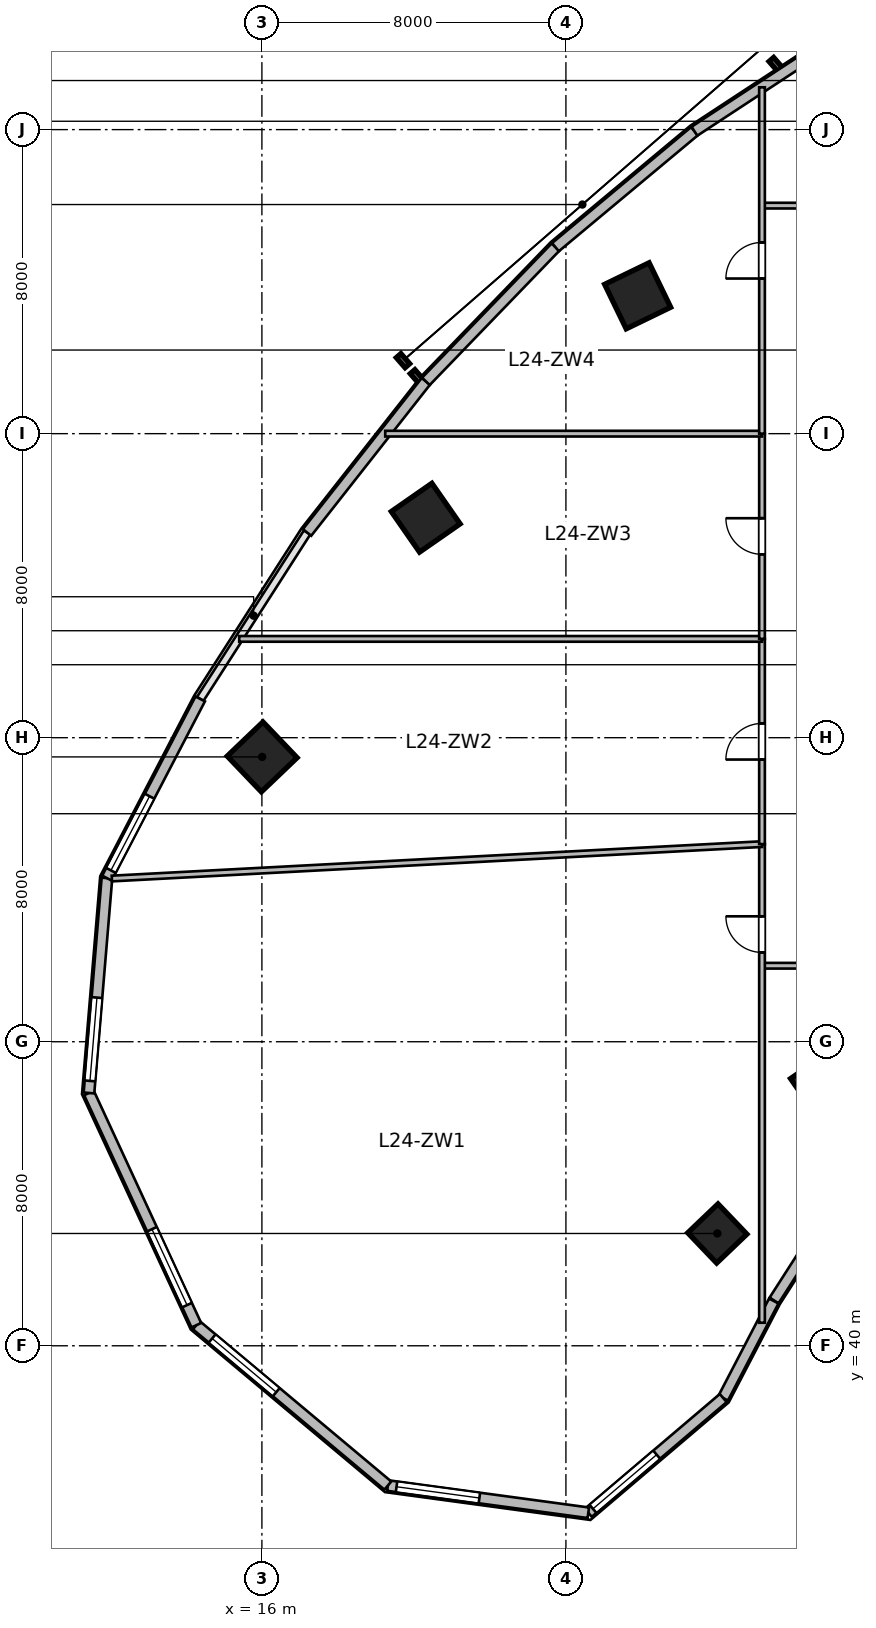
"""IFC4 building model, lengths in metres.
Left out: names, types, materials, properties, quantities, classifications, styles, units other than length and angle.
Written with IfcOpenShell. Run it as: python <this file> out.ifc"""

import sys

from ifc_helpers import new_model, si_unit, direction, frame, frame_2d, origin, origin_2d, place, context, subcontext, project, spatial, rectangle, extrude, source, transform, mapped, element, fill, save


model = new_model("IFC4")
c1 = context("Model", 3, precision=1e-05, world=origin(), true_north=direction((0.0, 1.0)))
c2 = subcontext(c1, "Body", "Model", "MODEL_VIEW")
j1 = project(units=[si_unit("LENGTHUNIT", "METRE"), si_unit("PLANEANGLEUNIT", "RADIAN")], contexts=[c1])
p1 = place(None, origin())
s1 = spatial("IfcSite", under=j1, at=p1, CompositionType="ELEMENT")
p2 = place(p1, origin())
s2 = spatial("IfcBuilding", under=s1, at=p2, CompositionType="ELEMENT")
p3 = place(p2, frame((0.0, 0.0, 103.8)))
s3 = spatial("IfcBuildingStorey", under=s2, at=p3, CompositionType="ELEMENT", Elevation=103.8)
m1 = source(origin(), c2, "Body", "SweptSolid", [
    extrude(rectangle(XDim=1.1, YDim=1.1, at=origin_2d()), origin(), (0.0, 0.0, 1.0), 3.9),
])
p4 = place(p3, frame((27.985, 42.955, 0.0), z_axis=(0.0, 0.0, 1.0), x_axis=(-0.690756218984, 0.723087716626, 0.0)))
e1 = element("IfcColumn", 1, at=p4, inside=s3, PredefinedType="COLUMN", context=c2, shape_type="MappedRepresentation", body=[
    mapped(m1, transform((0.0, 0.0, 0.0), scale=1.0)),
])
m2 = source(origin(), c2, "Body", "SweptSolid", [
    extrude(rectangle(XDim=1.3, YDim=1.3, at=origin_2d()), origin(), (0.0, 0.0, 1.0), 3.9),
])
p5 = place(p3, frame((16.007, 55.494, 0.0), z_axis=(0.0, 0.0, 1.0), x_axis=(-0.690756218984, 0.723087716626, 0.0)))
e2 = element("IfcColumn", 2, at=p5, inside=s3, PredefinedType="COLUMN", context=c2, shape_type="MappedRepresentation", body=[
    mapped(m2, transform((0.0, 0.0, 0.0), scale=1.0)),
])
p6 = place(p3, frame((30.677, 46.892, 0.0), z_axis=(0.0, 0.0, 1.0), x_axis=(-0.571143442153, 0.820850271661, 0.0)))
e3 = element("IfcColumn", 3, at=p6, inside=s3, PredefinedType="COLUMN", context=c2, shape_type="MappedRepresentation", body=[
    mapped(m1, transform((0.0, 0.0, 0.0), scale=1.0)),
])
for number, where, z_axis, x_axis in (
    (4, (20.311, 61.789, 0.0), (0.0, 0.0, 1.0), (-0.571, 0.821, 0.0)),
    (5, (25.888, 67.627, 0.0), (0.0, 0.0, 1.0), (-0.436, 0.9, 0.0)),
):
    element("IfcColumn", number, at=place(p3, frame(where, z_axis=z_axis, x_axis=x_axis)), inside=s3, PredefinedType="COLUMN", context=c2, shape_type="MappedRepresentation", body=[
        mapped(m2, transform((0.0, 0.0, 0.0), scale=1.0)),
    ])
m3 = source(origin(), c2, "Body", "SweptSolid", [
    extrude(rectangle(XDim=2.84, YDim=0.28, at=frame_2d((1.42, 0.0))), origin(), (0.0, 0.0, 1.0), 3.65),
])
p7 = place(p3, frame((31.011, 43.582, 0.0), z_axis=(0.0, 0.0, 1.0), x_axis=(-0.540214368057, -0.841527442538, 0.0)))
e6 = element("IfcWall", 6, at=p7, inside=s3, PredefinedType="SOLIDWALL", context=c2, shape_type="MappedRepresentation", body=[
    mapped(m3, transform((0.0, 0.0, 0.0), scale=1.0)),
])
m4 = source(origin(), c2, "Body", "SweptSolid", [
    extrude(rectangle(XDim=2.88, YDim=0.28, at=frame_2d((1.44, 0.0))), origin(), (0.0, 0.0, 1.0), 3.65),
])
p8 = place(p3, frame((29.469, 41.178, 0.0), z_axis=(0.0, 0.0, 1.0), x_axis=(-0.461769086658, -0.887000175088, 0.0)))
e7 = element("IfcWall", 7, at=p8, inside=s3, PredefinedType="SOLIDWALL", context=c2, shape_type="MappedRepresentation", body=[
    mapped(m4, transform((0.0, 0.0, 0.0), scale=1.0)),
])
m5 = source(origin(), c2, "Body", "SweptSolid", [
    extrude(rectangle(XDim=4.659, YDim=0.28, at=frame_2d((2.33, 0.0))), origin(), (0.0, 0.0, 1.0), 3.65),
])
p9 = place(p3, frame((28.139, 38.624, 0.0), z_axis=(0.0, 0.0, 1.0), x_axis=(-0.761913458795, -0.647678841176, 0.0)))
e8 = element("IfcWall", 8, at=p9, inside=s3, PredefinedType="SOLIDWALL", context=c2, shape_type="MappedRepresentation", body=[
    mapped(m5, transform((0.0, 0.0, 0.0), scale=1.0)),
])
p10 = place(p9, frame((2.299, 0.0, 0.95)))
e9 = element("IfcOpeningElement", 9, at=p10, cuts=e8, PredefinedType="OPENING", context=c2, shape_type="SweptSolid", body=[
    extrude(rectangle(XDim=2.2, YDim=2.1, at=frame_2d((1.1, 1.05))), frame((0.0, 0.15, 0.0), z_axis=(0.0, -1.0, 0.0), x_axis=(1.0, 0.0, 0.0)), (0.0, 0.0, 1.0), 0.3),
])
m6 = source(origin(), c2, "Body", "SweptSolid", [
    extrude(rectangle(XDim=5.324, YDim=0.28, at=frame_2d((2.662, 0.0))), origin(), (0.0, 0.0, 1.0), 3.65),
])
p11 = place(p3, frame((24.59, 35.606, 0.0), z_axis=(0.0, 0.0, 1.0), x_axis=(-0.990931467223, 0.134368252451, 0.0)))
e10 = element("IfcWall", 10, at=p11, inside=s3, PredefinedType="SOLIDWALL", context=c2, shape_type="MappedRepresentation", body=[
    mapped(m6, transform((0.0, 0.0, 0.0), scale=1.0)),
])
p12 = place(p11, frame((2.893, 0.0, 0.95)))
e11 = element("IfcOpeningElement", 11, at=p12, cuts=e10, PredefinedType="OPENING", context=c2, shape_type="SweptSolid", body=[
    extrude(rectangle(XDim=2.2, YDim=2.1, at=frame_2d((1.1, 1.05))), frame((0.0, 0.15, 0.0), z_axis=(0.0, -1.0, 0.0), x_axis=(1.0, 0.0, 0.0)), (0.0, 0.0, 1.0), 0.3),
])
m7 = source(origin(), c2, "Body", "SweptSolid", [
    extrude(rectangle(XDim=6.573, YDim=0.28, at=frame_2d((3.287, 0.0))), origin(), (0.0, 0.0, 1.0), 3.65),
])
p13 = place(p3, frame((19.314, 36.322, 0.0), z_axis=(0.0, 0.0, 1.0), x_axis=(-0.766715154163, 0.641987439423, 0.0)))
e12 = element("IfcWall", 12, at=p13, inside=s3, PredefinedType="SOLIDWALL", context=c2, shape_type="MappedRepresentation", body=[
    mapped(m7, transform((0.0, 0.0, 0.0), scale=1.0)),
])
p14 = place(p13, frame((3.83, 0.0, 0.95)))
e13 = element("IfcOpeningElement", 13, at=p14, cuts=e12, PredefinedType="OPENING", context=c2, shape_type="SweptSolid", body=[
    extrude(rectangle(XDim=2.2, YDim=2.1, at=frame_2d((1.1, 1.05))), frame((0.0, 0.15, 0.0), z_axis=(0.0, -1.0, 0.0), x_axis=(1.0, 0.0, 0.0)), (0.0, 0.0, 1.0), 0.3),
])
m8 = source(origin(), c2, "Body", "SweptSolid", [
    extrude(rectangle(XDim=6.732, YDim=0.28, at=frame_2d((3.366, 0.0))), origin(), (0.0, 0.0, 1.0), 3.65),
])
p15 = place(p3, frame((14.275, 40.541, 0.0), z_axis=(0.0, 0.0, 1.0), x_axis=(-0.419644552709, 0.907688520023, 0.0)))
e14 = element("IfcWall", 14, at=p15, inside=s3, PredefinedType="SOLIDWALL", context=c2, shape_type="MappedRepresentation", body=[
    mapped(m8, transform((0.0, 0.0, 0.0), scale=1.0)),
])
p16 = place(p15, frame((0.583, 0.0, 0.95)))
e15 = element("IfcOpeningElement", 15, at=p16, cuts=e14, PredefinedType="OPENING", context=c2, shape_type="SweptSolid", body=[
    extrude(rectangle(XDim=2.2, YDim=2.1, at=frame_2d((1.1, 1.05))), frame((0.0, 0.15, 0.0), z_axis=(0.0, -1.0, 0.0), x_axis=(1.0, 0.0, 0.0)), (0.0, 0.0, 1.0), 0.3),
])
m9 = source(origin(), c2, "Body", "SweptSolid", [
    extrude(rectangle(XDim=5.674, YDim=0.28, at=frame_2d((2.837, 0.0))), origin(), (0.0, 0.0, 1.0), 3.65),
])
p17 = place(p3, frame((11.45, 46.652, 0.0), z_axis=(0.0, 0.0, 1.0), x_axis=(0.083309007867, 0.996523762491, 0.0)))
e16 = element("IfcWall", 16, at=p17, inside=s3, PredefinedType="SOLIDWALL", context=c2, shape_type="MappedRepresentation", body=[
    mapped(m9, transform((0.0, 0.0, 0.0), scale=1.0)),
])
p18 = place(p17, frame((0.318, 0.0, 0.95)))
e17 = element("IfcOpeningElement", 17, at=p18, cuts=e16, PredefinedType="OPENING", context=c2, shape_type="SweptSolid", body=[
    extrude(rectangle(XDim=2.2, YDim=2.1, at=frame_2d((1.1, 1.05))), frame((0.0, 0.15, 0.0), z_axis=(0.0, -1.0, 0.0), x_axis=(1.0, 0.0, 0.0)), (0.0, 0.0, 1.0), 0.3),
])
m10 = source(origin(), c2, "Body", "SweptSolid", [
    extrude(rectangle(XDim=5.315, YDim=0.28, at=frame_2d((2.658, 0.0))), origin(), (0.0, 0.0, 1.0), 3.65),
])
p19 = place(p3, frame((11.922, 52.305, 0.0), z_axis=(0.0, 0.0, 1.0), x_axis=(0.461760527822, 0.887004630735, 0.0)))
e18 = element("IfcWall", 18, at=p19, inside=s3, PredefinedType="SOLIDWALL", context=c2, shape_type="MappedRepresentation", body=[
    mapped(m10, transform((0.0, 0.0, 0.0), scale=1.0)),
])
p20 = place(p19, frame((0.229, 0.0, 0.95)))
e19 = element("IfcOpeningElement", 19, at=p20, cuts=e18, PredefinedType="OPENING", context=c2, shape_type="SweptSolid", body=[
    extrude(rectangle(XDim=2.2, YDim=2.1, at=frame_2d((1.1, 1.05))), frame((0.0, 0.15, 0.0), z_axis=(0.0, -1.0, 0.0), x_axis=(1.0, 0.0, 0.0)), (0.0, 0.0, 1.0), 0.3),
])
m11 = source(origin(), c2, "Body", "SweptSolid", [
    extrude(rectangle(XDim=5.058, YDim=0.28, at=frame_2d((2.529, 0.0))), origin(), (0.0, 0.0, 1.0), 3.65),
])
p21 = place(p3, frame((17.188, 61.4, 0.0), z_axis=(0.0, 0.0, 1.0), x_axis=(0.618145507434, 0.786063694391, 0.0)))
e20 = element("IfcWall", 20, at=p21, inside=s3, PredefinedType="SOLIDWALL", context=c2, shape_type="MappedRepresentation", body=[
    mapped(m11, transform((0.0, 0.0, 0.0), scale=1.0)),
])
m12 = source(origin(), c2, "Body", "SweptSolid", [
    extrude(rectangle(XDim=4.908, YDim=0.28, at=frame_2d((2.454, 0.0))), origin(), (0.0, 0.0, 1.0), 3.65),
])
p22 = place(p3, frame((20.315, 65.376, 0.0), z_axis=(0.0, 0.0, 1.0), x_axis=(0.694613154328, 0.719383462302, 0.0)))
e21 = element("IfcWall", 21, at=p22, inside=s3, PredefinedType="SOLIDWALL", context=c2, shape_type="MappedRepresentation", body=[
    mapped(m12, transform((0.0, 0.0, 0.0), scale=1.0)),
])
m13 = source(origin(), c2, "Body", "SweptSolid", [
    extrude(rectangle(XDim=4.762, YDim=0.28, at=frame_2d((2.381, 0.0))), origin(), (0.0, 0.0, 1.0), 3.65),
])
p23 = place(p3, frame((23.725, 68.907, 0.0), z_axis=(0.0, 0.0, 1.0), x_axis=(0.767952279762, 0.640507061638, 0.0)))
e22 = element("IfcWall", 22, at=p23, inside=s3, PredefinedType="SOLIDWALL", context=c2, shape_type="MappedRepresentation", body=[
    mapped(m13, transform((0.0, 0.0, 0.0), scale=1.0)),
])
m14 = source(origin(), c2, "Body", "SweptSolid", [
    extrude(rectangle(XDim=4.626, YDim=0.28, at=frame_2d((2.313, 0.0))), origin(), (0.0, 0.0, 1.0), 3.65),
])
p24 = place(p3, frame((27.382, 71.958, 0.0), z_axis=(0.0, 0.0, 1.0), x_axis=(0.83595938331, 0.548791316855, 0.0)))
e23 = element("IfcWall", 23, at=p24, inside=s3, PredefinedType="SOLIDWALL", context=c2, shape_type="MappedRepresentation", body=[
    mapped(m14, transform((0.0, 0.0, 0.0), scale=1.0)),
])
m15 = source(origin(), c2, "Body", "SweptSolid", [
    extrude(rectangle(XDim=2.5, YDim=0.15, at=frame_2d((1.25, 0.0))), origin(), (0.0, 0.0, 1.0), 3.65),
])
p25 = place(p3, frame((29.2, 50.0, 0.0), z_axis=(0.0, 0.0, 1.0), x_axis=(1.0, 0.0, 0.0)))
e24 = element("IfcWall", 24, at=p25, inside=s3, PredefinedType="PARTITIONING", context=c2, shape_type="MappedRepresentation", body=[
    mapped(m15, transform((0.0, 0.0, 0.0), scale=1.0)),
])
m16 = source(origin(), c2, "Body", "SweptSolid", [
    extrude(rectangle(XDim=2.5, YDim=0.15, at=frame_2d((1.25, 0.0))), origin(), (0.0, 0.0, 1.0), 3.022),
])
p26 = place(p3, frame((29.2, 70.0, 0.0), z_axis=(0.0, 0.0, 1.0), x_axis=(1.0, 0.0, 0.0)))
e25 = element("IfcWall", 25, at=p26, inside=s3, PredefinedType="PARTITIONING", context=c2, shape_type="MappedRepresentation", body=[
    mapped(m16, transform((0.0, 0.0, 0.0), scale=1.0)),
])
m17 = source(origin(), c2, "Body", "SweptSolid", [
    extrude(rectangle(XDim=12.594, YDim=0.15, at=frame_2d((6.297, 0.0))), origin(), (0.0, 0.0, 1.0), 2.942),
])
p27 = place(p3, frame((29.16, 40.606, 0.0), z_axis=(0.0, 0.0, 1.0), x_axis=(0.0, 1.0, 0.0)))
e26 = element("IfcWall", 26, at=p27, inside=s3, PredefinedType="PARTITIONING", context=c2, shape_type="MappedRepresentation", body=[
    mapped(m17, transform((0.0, 0.0, 0.0), scale=1.0)),
])
p28 = place(p27, frame((9.744, 0.0, 0.0)))
e27 = element("IfcOpeningElement", 27, at=p28, cuts=e26, PredefinedType="OPENING", context=c2, shape_type="SweptSolid", body=[
    extrude(rectangle(XDim=0.95, YDim=2.1, at=frame_2d((0.475, 1.05))), frame((0.0, 0.085, 0.0), z_axis=(0.0, -1.0, 0.0), x_axis=(1.0, 0.0, 0.0)), (0.0, 0.0, 1.0), 0.17),
])
m18 = source(origin(), c2, "Body", "SweptSolid", [
    extrude(rectangle(XDim=17.132, YDim=0.15, at=frame_2d((8.566, 0.0))), origin(), (0.0, 0.0, 1.0), 3.65),
])
p29 = place(p3, frame((12.052, 52.294, 0.0), z_axis=(0.0, 0.0, 1.0), x_axis=(0.998601444231, 0.05286923094, 0.0)))
e28 = element("IfcWall", 28, at=p29, inside=s3, PredefinedType="PARTITIONING", context=c2, shape_type="MappedRepresentation", body=[
    mapped(m18, transform((0.0, 0.0, 0.0), scale=1.0)),
])
m19 = source(origin(), c2, "Body", "SweptSolid", [
    extrude(rectangle(XDim=5.4, YDim=0.15, at=frame_2d((2.7, 0.0))), origin(), (0.0, 0.0, 1.0), 3.022),
])
p30 = place(p3, frame((29.16, 53.2, 0.0), z_axis=(0.0, 0.0, 1.0), x_axis=(0.0, 1.0, 0.0)))
e29 = element("IfcWall", 29, at=p30, inside=s3, PredefinedType="PARTITIONING", context=c2, shape_type="MappedRepresentation", body=[
    mapped(m19, transform((0.0, 0.0, 0.0), scale=1.0)),
])
p31 = place(p30, frame((2.225, 0.0, 0.0)))
e30 = element("IfcOpeningElement", 30, at=p31, cuts=e29, PredefinedType="OPENING", context=c2, shape_type="SweptSolid", body=[
    extrude(rectangle(XDim=0.95, YDim=2.1, at=frame_2d((0.475, 1.05))), frame((0.0, 0.085, 0.0), z_axis=(0.0, -1.0, 0.0), x_axis=(1.0, 0.0, 0.0)), (0.0, 0.0, 1.0), 0.17),
])
m20 = source(origin(), c2, "Body", "SweptSolid", [
    extrude(rectangle(XDim=13.757, YDim=0.15, at=frame_2d((6.878, 0.0))), origin(), (0.0, 0.0, 1.0), 3.65),
])
p32 = place(p3, frame((15.403, 58.6, 0.0), z_axis=(0.0, 0.0, 1.0), x_axis=(1.0, 0.0, 0.0)))
e31 = element("IfcWall", 31, at=p32, inside=s3, PredefinedType="PARTITIONING", context=c2, shape_type="MappedRepresentation", body=[
    mapped(m20, transform((0.0, 0.0, 0.0), scale=1.0)),
])
m21 = source(origin(), c2, "Body", "SweptSolid", [
    extrude(rectangle(XDim=5.4, YDim=0.15, at=frame_2d((2.7, 0.0))), origin(), (0.0, 0.0, 1.0), 2.942),
])
p33 = place(p3, frame((29.16, 58.6, 0.0), z_axis=(0.0, 0.0, 1.0), x_axis=(0.0, 1.0, 0.0)))
e32 = element("IfcWall", 32, at=p33, inside=s3, PredefinedType="PARTITIONING", context=c2, shape_type="MappedRepresentation", body=[
    mapped(m21, transform((0.0, 0.0, 0.0), scale=1.0)),
])
p34 = place(p33, frame((2.225, 0.0, 0.0)))
e33 = element("IfcOpeningElement", 33, at=p34, cuts=e32, PredefinedType="OPENING", context=c2, shape_type="SweptSolid", body=[
    extrude(rectangle(XDim=0.95, YDim=2.1, at=frame_2d((0.475, 1.05))), frame((0.0, 0.085, 0.0), z_axis=(0.0, -1.0, 0.0), x_axis=(1.0, 0.0, 0.0)), (0.0, 0.0, 1.0), 0.17),
])
m22 = source(origin(), c2, "Body", "SweptSolid", [
    extrude(rectangle(XDim=9.914, YDim=0.15, at=frame_2d((4.957, 0.0))), origin(), (0.0, 0.0, 1.0), 3.65),
])
p35 = place(p3, frame((19.246, 64.0, 0.0), z_axis=(0.0, 0.0, 1.0), x_axis=(1.0, 0.0, 0.0)))
e34 = element("IfcWall", 34, at=p35, inside=s3, PredefinedType="PARTITIONING", context=c2, shape_type="MappedRepresentation", body=[
    mapped(m22, transform((0.0, 0.0, 0.0), scale=1.0)),
])
m23 = source(origin(), c2, "Body", "SweptSolid", [
    extrude(rectangle(XDim=9.113, YDim=0.15, at=frame_2d((4.557, 0.0))), origin(), (0.0, 0.0, 1.0), 3.65),
])
p36 = place(p3, frame((29.16, 64.0, 0.0), z_axis=(0.0, 0.0, 1.0), x_axis=(0.0, 1.0, 0.0)))
e35 = element("IfcWall", 35, at=p36, inside=s3, PredefinedType="PARTITIONING", context=c2, shape_type="MappedRepresentation", body=[
    mapped(m23, transform((0.0, 0.0, 0.0), scale=1.0)),
])
p37 = place(p36, frame((4.082, 0.0, 0.0)))
e36 = element("IfcOpeningElement", 36, at=p37, cuts=e35, PredefinedType="OPENING", context=c2, shape_type="SweptSolid", body=[
    extrude(rectangle(XDim=0.95, YDim=2.1, at=frame_2d((0.475, 1.05))), frame((0.0, 0.085, 0.0), z_axis=(0.0, -1.0, 0.0), x_axis=(1.0, 0.0, 0.0)), (0.0, 0.0, 1.0), 0.17),
])
m24 = source(origin(), c2, "Body", "SweptSolid", [
    extrude(rectangle(XDim=2.2, YDim=2.1, at=frame_2d((1.1, 1.05))), frame((0.0, 0.03, 0.0), z_axis=(0.0, -1.0, 0.0), x_axis=(1.0, 0.0, 0.0)), (0.0, 0.0, 1.0), 0.06),
])
p38 = place(p10, origin())
e37 = element("IfcWindow", 37, at=p38, inside=s3, PartitioningType="TRIPLE_PANEL_VERTICAL", PredefinedType="WINDOW", context=c2, shape_type="MappedRepresentation", body=[
    mapped(m24, transform((0.0, 0.0, 0.0), scale=1.0)),
])
fill(e9, e37)
p39 = place(p12, origin())
e38 = element("IfcWindow", 38, at=p39, inside=s3, PartitioningType="TRIPLE_PANEL_VERTICAL", PredefinedType="WINDOW", context=c2, shape_type="MappedRepresentation", body=[
    mapped(m24, transform((0.0, 0.0, 0.0), scale=1.0)),
])
fill(e11, e38)
p40 = place(p14, origin())
e39 = element("IfcWindow", 39, at=p40, inside=s3, PartitioningType="TRIPLE_PANEL_VERTICAL", PredefinedType="WINDOW", context=c2, shape_type="MappedRepresentation", body=[
    mapped(m24, transform((0.0, 0.0, 0.0), scale=1.0)),
])
fill(e13, e39)
p41 = place(p16, origin())
e40 = element("IfcWindow", 40, at=p41, inside=s3, PartitioningType="TRIPLE_PANEL_VERTICAL", PredefinedType="WINDOW", context=c2, shape_type="MappedRepresentation", body=[
    mapped(m24, transform((0.0, 0.0, 0.0), scale=1.0)),
])
fill(e15, e40)
p42 = place(p18, origin())
e41 = element("IfcWindow", 41, at=p42, inside=s3, PartitioningType="TRIPLE_PANEL_VERTICAL", PredefinedType="WINDOW", context=c2, shape_type="MappedRepresentation", body=[
    mapped(m24, transform((0.0, 0.0, 0.0), scale=1.0)),
])
fill(e17, e41)
p43 = place(p20, origin())
e42 = element("IfcWindow", 42, at=p43, inside=s3, PartitioningType="TRIPLE_PANEL_VERTICAL", PredefinedType="WINDOW", context=c2, shape_type="MappedRepresentation", body=[
    mapped(m24, transform((0.0, 0.0, 0.0), scale=1.0)),
])
fill(e19, e42)
m25 = source(origin(), c2, "Body", "SweptSolid", [
    extrude(rectangle(XDim=0.95, YDim=2.1, at=frame_2d((0.475, 1.05))), frame((0.0, 0.025, 0.0), z_axis=(0.0, -1.0, 0.0), x_axis=(1.0, 0.0, 0.0)), (0.0, 0.0, 1.0), 0.05),
])
p44 = place(p28, origin())
e43 = element("IfcDoor", 43, at=p44, inside=s3, OperationType="SINGLE_SWING_RIGHT", PredefinedType="DOOR", context=c2, shape_type="MappedRepresentation", body=[
    mapped(m25, transform((0.0, 0.0, 0.0), scale=1.0)),
])
fill(e27, e43)
p45 = place(p31, origin())
e44 = element("IfcDoor", 44, at=p45, inside=s3, OperationType="SINGLE_SWING_LEFT", PredefinedType="DOOR", context=c2, shape_type="MappedRepresentation", body=[
    mapped(m25, transform((0.0, 0.0, 0.0), scale=1.0)),
])
fill(e30, e44)
p46 = place(p34, origin())
e45 = element("IfcDoor", 45, at=p46, inside=s3, OperationType="SINGLE_SWING_RIGHT", PredefinedType="DOOR", context=c2, shape_type="MappedRepresentation", body=[
    mapped(m25, transform((0.0, 0.0, 0.0), scale=1.0)),
])
fill(e33, e45)
p47 = place(p37, origin())
e46 = element("IfcDoor", 46, at=p47, inside=s3, OperationType="SINGLE_SWING_LEFT", PredefinedType="DOOR", context=c2, shape_type="MappedRepresentation", body=[
    mapped(m25, transform((0.0, 0.0, 0.0), scale=1.0)),
])
fill(e36, e46)
save(model, sys.argv[1])
